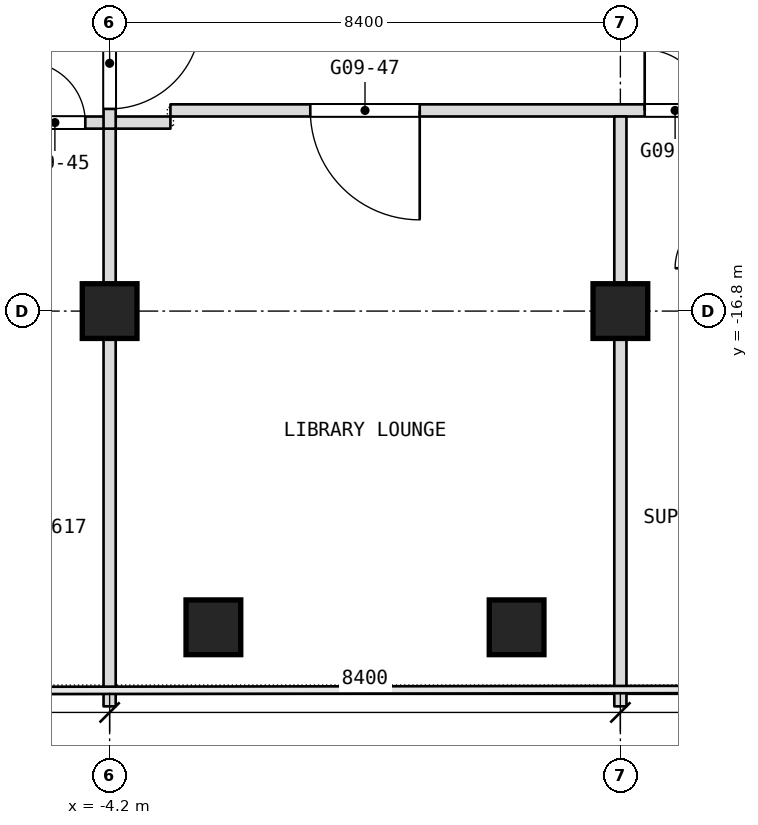
"""IFC4 building model, lengths in metres.
Left out: names, types, materials, properties, quantities, classifications, styles, units other than length and angle.
Written with IfcOpenShell. Run it as: python <this file> out.ifc"""

import sys

from ifc_helpers import new_model, si_unit, direction, frame, frame_2d, origin, origin_2d, place, context, subcontext, project, spatial, rectangle, extrude, element, fill, save


model = new_model("IFC4")
c1 = context("Model", 3, precision=1e-05, world=origin(), true_north=direction((0.0, 1.0)))
c2 = subcontext(c1, "Body", "Model", "MODEL_VIEW")
j1 = project(units=[si_unit("LENGTHUNIT", "METRE"), si_unit("PLANEANGLEUNIT", "RADIAN")], contexts=[c1])
p1 = place(None, origin())
s1 = spatial("IfcSite", under=j1, at=p1, CompositionType="ELEMENT")
p2 = place(p1, origin())
s2 = spatial("IfcBuilding", under=s1, at=p2, CompositionType="ELEMENT")
p3 = place(p2, frame((0.0, 0.0, 119.3)))
s3 = spatial("IfcBuildingStorey", under=s2, at=p3, CompositionType="ELEMENT", Elevation=119.3)
for number, where, z_axis, x_axis in (
    (1, (-4.2, -16.8, 0.0), (0.0, 0.0, 1.0), (1.0, 0.0, 0.0)),
    (2, (4.2, -16.8, 0.0), (0.0, 0.0, 1.0), (1.0, 0.0, 0.0)),
    (3, (2.493, -22.0, 0.0), (0.0, 0.0, 1.0), (1.0, 0.0, 0.0)),
    (4, (-2.493, -22.0, 0.0), (0.0, 0.0, 1.0), (1.0, 0.0, 0.0)),
):
    element("IfcColumn", number, at=place(p3, frame(where, z_axis=z_axis, x_axis=x_axis)), inside=s3, PredefinedType="COLUMN", context=c2, shape_type="SweptSolid", body=[
        extrude(rectangle(XDim=0.9, YDim=0.9, at=origin_2d()), origin(), (0.0, 0.0, 1.0), 3.6),
    ])
p4 = place(p3, frame((-12.4, -13.7, 0.0), z_axis=(0.0, 0.0, 1.0), x_axis=(1.0, 0.0, 0.0)))
e5 = element("IfcWall", 5, at=p4, inside=s3, PredefinedType="PARTITIONING", context=c2, shape_type="SweptSolid", body=[
    extrude(rectangle(XDim=9.2, YDim=0.2, at=frame_2d((4.6, 0.0))), origin(), (0.0, 0.0, 1.0), 3.34),
])
p5 = place(p4, frame((0.2, 0.0, 0.0)))
e6 = element("IfcOpeningElement", 6, at=p5, cuts=e5, PredefinedType="OPENING", context=c2, shape_type="SweptSolid", body=[
    extrude(rectangle(XDim=1.0, YDim=2.1, at=frame_2d((0.5, 1.05))), frame((0.0, 0.1, 0.0), z_axis=(0.0, -1.0, 0.0), x_axis=(1.0, 0.0, 0.0)), (0.0, 0.0, 1.0), 0.2),
])
p6 = place(p4, frame((6.8, 0.0, 0.0)))
e7 = element("IfcOpeningElement", 7, at=p6, cuts=e5, PredefinedType="OPENING", context=c2, shape_type="SweptSolid", body=[
    extrude(rectangle(XDim=1.0, YDim=2.1, at=frame_2d((0.5, 1.05))), frame((0.0, 0.1, 0.0), z_axis=(0.0, -1.0, 0.0), x_axis=(1.0, 0.0, 0.0)), (0.0, 0.0, 1.0), 0.2),
])
p7 = place(p3, frame((-3.2, -13.5, 0.0), z_axis=(0.0, 0.0, 1.0), x_axis=(1.0, 0.0, 0.0)))
e8 = element("IfcWall", 8, at=p7, inside=s3, PredefinedType="PARTITIONING", context=c2, shape_type="SweptSolid", body=[
    extrude(rectangle(XDim=19.9, YDim=0.2, at=frame_2d((9.95, 0.0))), origin(), (0.0, 0.0, 1.0), 3.34),
])
p8 = place(p7, frame((2.3, 0.0, 0.0)))
e9 = element("IfcOpeningElement", 9, at=p8, cuts=e8, PredefinedType="OPENING", context=c2, shape_type="SweptSolid", body=[
    extrude(rectangle(XDim=1.8, YDim=2.1, at=frame_2d((0.9, 1.05))), frame((0.0, 0.1, 0.0), z_axis=(0.0, -1.0, 0.0), x_axis=(1.0, 0.0, 0.0)), (0.0, 0.0, 1.0), 0.2),
])
p9 = place(p7, frame((7.8, 0.0, 0.0)))
e10 = element("IfcOpeningElement", 10, at=p9, cuts=e8, PredefinedType="OPENING", context=c2, shape_type="SweptSolid", body=[
    extrude(rectangle(XDim=1.0, YDim=2.1, at=frame_2d((0.5, 1.05))), frame((0.0, 0.1, 0.0), z_axis=(0.0, -1.0, 0.0), x_axis=(1.0, 0.0, 0.0)), (0.0, 0.0, 1.0), 0.2),
])
p10 = place(p7, frame((14.4, 0.0, 0.0)))
e11 = element("IfcOpeningElement", 11, at=p10, cuts=e8, PredefinedType="OPENING", context=c2, shape_type="SweptSolid", body=[
    extrude(rectangle(XDim=1.0, YDim=2.1, at=frame_2d((0.5, 1.05))), frame((0.0, 0.1, 0.0), z_axis=(0.0, -1.0, 0.0), x_axis=(1.0, 0.0, 0.0)), (0.0, 0.0, 1.0), 0.2),
])
p11 = place(p7, frame((18.6, 0.0, 0.0)))
e12 = element("IfcOpeningElement", 12, at=p11, cuts=e8, PredefinedType="OPENING", context=c2, shape_type="SweptSolid", body=[
    extrude(rectangle(XDim=1.0, YDim=2.1, at=frame_2d((0.5, 1.05))), frame((0.0, 0.1, 0.0), z_axis=(0.0, -1.0, 0.0), x_axis=(1.0, 0.0, 0.0)), (0.0, 0.0, 1.0), 0.2),
])
p12 = place(p3, frame((4.2, -23.3, 0.0), z_axis=(0.0, 0.0, 1.0), x_axis=(0.0, 1.0, 0.0)))
e13 = element("IfcWall", 13, at=p12, inside=s3, PredefinedType="PARTITIONING", context=c2, shape_type="SweptSolid", body=[
    extrude(rectangle(XDim=9.7, YDim=0.2, at=frame_2d((4.85, 0.0))), origin(), (0.0, 0.0, 1.0), 3.34),
])
p13 = place(p3, frame((-4.2, -23.3, 0.0), z_axis=(0.0, 0.0, 1.0), x_axis=(0.0, 1.0, 0.0)))
e14 = element("IfcWall", 14, at=p13, inside=s3, PredefinedType="PARTITIONING", context=c2, shape_type="SweptSolid", body=[
    extrude(rectangle(XDim=9.5, YDim=0.2, at=frame_2d((4.75, 0.0))), origin(), (0.0, 0.0, 1.0), 3.34),
])
p14 = place(p3, frame((-4.2, -13.8, 0.0), z_axis=(0.0, 0.0, 1.0), x_axis=(0.0, 1.0, 0.0)))
e15 = element("IfcWall", 15, at=p14, inside=s3, PredefinedType="PARTITIONING", context=c2, shape_type="SweptSolid", body=[
    extrude(rectangle(XDim=13.8, YDim=0.2, at=frame_2d((6.9, 0.0))), origin(), (0.0, 0.0, 1.0), 3.34),
])
p15 = place(p14, frame((12.15, 0.0, 0.0)))
e16 = element("IfcOpeningElement", 16, at=p15, cuts=e15, PredefinedType="OPENING", context=c2, shape_type="SweptSolid", body=[
    extrude(rectangle(XDim=1.5, YDim=2.1, at=frame_2d((0.75, 1.05))), frame((0.0, 0.1, 0.0), z_axis=(0.0, -1.0, 0.0), x_axis=(1.0, 0.0, 0.0)), (0.0, 0.0, 1.0), 0.2),
])
p16 = place(p14, frame((0.325, 0.0, 0.0)))
e17 = element("IfcOpeningElement", 17, at=p16, cuts=e15, PredefinedType="OPENING", context=c2, shape_type="SweptSolid", body=[
    extrude(rectangle(XDim=1.5, YDim=2.1, at=frame_2d((0.75, 1.05))), frame((0.0, 0.1, 0.0), z_axis=(0.0, -1.0, 0.0), x_axis=(1.0, 0.0, 0.0)), (0.0, 0.0, 1.0), 0.2),
])
p17 = place(p6, origin())
e18 = element("IfcDoor", 18, at=p17, inside=s3, OperationType="SINGLE_SWING_LEFT", PredefinedType="DOOR", context=c2, shape_type="SweptSolid", body=[
    extrude(rectangle(XDim=1.0, YDim=2.1, at=frame_2d((0.5, 1.05))), frame((0.0, 0.025, 0.0), z_axis=(0.0, -1.0, 0.0), x_axis=(1.0, 0.0, 0.0)), (0.0, 0.0, 1.0), 0.05),
])
fill(e7, e18)
p18 = place(p8, origin())
e19 = element("IfcDoor", 19, at=p18, inside=s3, OperationType="DOUBLE_DOOR_SINGLE_SWING", PredefinedType="DOOR", context=c2, shape_type="SweptSolid", body=[
    extrude(rectangle(XDim=1.8, YDim=2.1, at=frame_2d((0.9, 1.05))), frame((0.0, 0.025, 0.0), z_axis=(0.0, -1.0, 0.0), x_axis=(1.0, 0.0, 0.0)), (0.0, 0.0, 1.0), 0.05),
])
fill(e9, e19)
p19 = place(p9, origin())
e20 = element("IfcDoor", 20, at=p19, inside=s3, OperationType="SINGLE_SWING_RIGHT", PredefinedType="DOOR", context=c2, shape_type="SweptSolid", body=[
    extrude(rectangle(XDim=1.0, YDim=2.1, at=frame_2d((0.5, 1.05))), frame((0.0, 0.025, 0.0), z_axis=(0.0, -1.0, 0.0), x_axis=(1.0, 0.0, 0.0)), (0.0, 0.0, 1.0), 0.05),
])
fill(e10, e20)
p20 = place(p16, origin())
e21 = element("IfcDoor", 21, at=p20, inside=s3, OperationType="DOUBLE_DOOR_DOUBLE_SWING", PredefinedType="DOOR", context=c2, shape_type="SweptSolid", body=[
    extrude(rectangle(XDim=1.5, YDim=2.1, at=frame_2d((0.75, 1.05))), frame((0.0, 0.025, 0.0), z_axis=(0.0, -1.0, 0.0), x_axis=(1.0, 0.0, 0.0)), (0.0, 0.0, 1.0), 0.05),
])
fill(e17, e21)
save(model, sys.argv[1])
